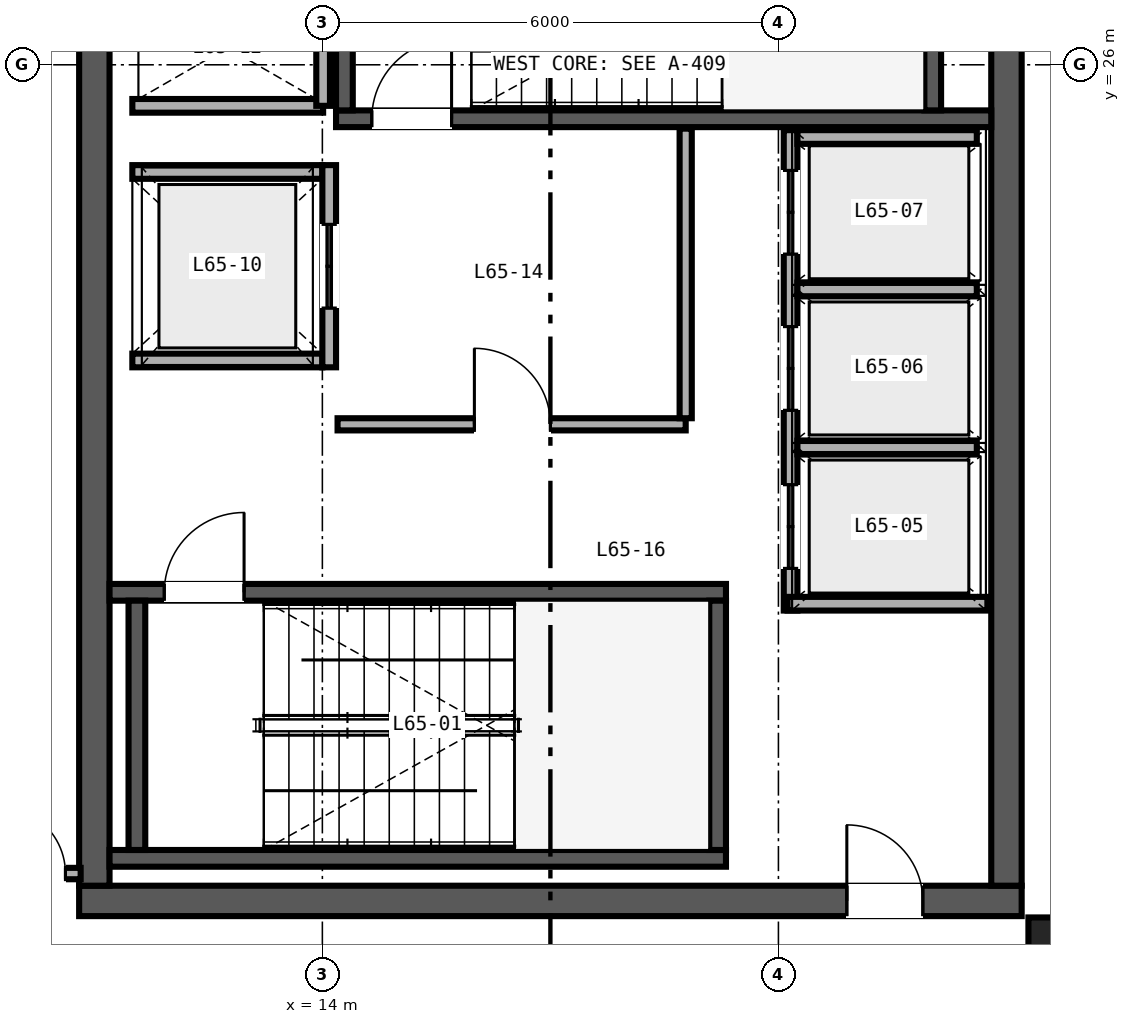
"""IFC4 building model, lengths in metres.
Left out: names, types, materials, properties, quantities, classifications, styles, units other than length and angle.
Written with IfcOpenShell. Run it as: python <this file> out.ifc"""

import sys

from ifc_helpers import new_model, si_unit, direction, frame, frame_2d, origin, origin_2d, place, context, subcontext, project, spatial, rectangle, i_section, extrude, source, transform, mapped, element, fill, save


model = new_model("IFC4")
c1 = context("Model", 3, precision=1e-05, world=origin(), true_north=direction((0.0, 1.0)))
c2 = subcontext(c1, "Body", "Model", "MODEL_VIEW")
j1 = project(units=[si_unit("LENGTHUNIT", "METRE"), si_unit("PLANEANGLEUNIT", "RADIAN")], contexts=[c1])
p1 = place(None, origin())
s1 = spatial("IfcSite", under=j1, at=p1, CompositionType="ELEMENT")
p2 = place(p1, origin())
s2 = spatial("IfcBuilding", under=s1, at=p2, CompositionType="ELEMENT")
p3 = place(p2, frame((0.0, 0.0, 258.0)))
s3 = spatial("IfcBuildingStorey", under=s2, at=p3, CompositionType="ELEMENT", Elevation=258.0)
p4 = place(p3, frame((10.8, 15.0, 0.0), z_axis=(0.0, 0.0, 1.0), x_axis=(1.0, 0.0, 0.0)))
e1 = element("IfcWall", 1, at=p4, inside=s3, PredefinedType="SHEAR", context=c2, shape_type="SweptSolid", body=[
    extrude(rectangle(XDim=12.4, YDim=0.4, at=frame_2d((6.2, 0.0))), origin(), (0.0, 0.0, 1.0), 3.38),
])
p5 = place(p4, frame((10.1, 0.0, 0.0)))
e2 = element("IfcOpeningElement", 2, at=p5, cuts=e1, PredefinedType="OPENING", context=c2, shape_type="SweptSolid", body=[
    extrude(rectangle(XDim=1.0, YDim=2.15, at=frame_2d((0.5, 1.075))), frame((0.0, 0.21, 0.0), z_axis=(0.0, -1.0, 0.0), x_axis=(1.0, 0.0, 0.0)), (0.0, 0.0, 1.0), 0.42),
])
for number, where, z_axis, x_axis in (
    (3, (11.0, 15.2, 0.0), (0.0, 0.0, 1.0), (0.0, 1.0, 0.0)),
    (4, (23.0, 15.2, 0.0), (0.0, 0.0, 1.0), (0.0, 1.0, 0.0)),
):
    element("IfcWall", number, at=place(p3, frame(where, z_axis=z_axis, x_axis=x_axis)), inside=s3, PredefinedType="SHEAR", context=c2, shape_type="SweptSolid", body=[
        extrude(rectangle(XDim=21.6, YDim=0.4, at=frame_2d((10.8, 0.0))), origin(), (0.0, 0.0, 1.0), 3.38),
    ])
p6 = place(p3, frame((11.2, 15.56, 0.0), z_axis=(0.0, 0.0, 1.0), x_axis=(1.0, 0.0, 0.0)))
e5 = element("IfcWall", 5, at=p6, inside=s3, PredefinedType="SHEAR", context=c2, shape_type="SweptSolid", body=[
    extrude(rectangle(XDim=8.11, YDim=0.22, at=frame_2d((4.055, 0.0))), origin(), (0.0, 0.0, 1.0), 3.4),
])
p7 = place(p3, frame((11.2, 19.06, 0.0), z_axis=(0.0, 0.0, 1.0), x_axis=(1.0, 0.0, 0.0)))
e6 = element("IfcWall", 6, at=p7, inside=s3, PredefinedType="SHEAR", context=c2, shape_type="SweptSolid", body=[
    extrude(rectangle(XDim=8.11, YDim=0.22, at=frame_2d((4.055, 0.0))), origin(), (0.0, 0.0, 1.0), 3.4),
])
p8 = place(p7, frame((0.72, 0.0, 0.0)))
e7 = element("IfcOpeningElement", 7, at=p8, cuts=e6, PredefinedType="OPENING", context=c2, shape_type="SweptSolid", body=[
    extrude(rectangle(XDim=1.05, YDim=2.15, at=frame_2d((0.525, 1.075))), frame((0.0, 0.12, 0.0), z_axis=(0.0, -1.0, 0.0), x_axis=(1.0, 0.0, 0.0)), (0.0, 0.0, 1.0), 0.24),
])
for number, where, z_axis, x_axis in (
    (8, (11.56, 15.67, 0.0), (0.0, 0.0, 1.0), (0.0, 1.0, 0.0)),
    (9, (19.2, 15.67, 0.0), (0.0, 0.0, 1.0), (0.0, 1.0, 0.0)),
):
    element("IfcWall", number, at=place(p3, frame(where, z_axis=z_axis, x_axis=x_axis)), inside=s3, PredefinedType="SHEAR", context=c2, shape_type="SweptSolid", body=[
        extrude(rectangle(XDim=3.28, YDim=0.22, at=frame_2d((1.64, 0.0))), origin(), (0.0, 0.0, 1.0), 3.4),
    ])
p9 = place(p3, frame((14.18, 25.29, 0.0), z_axis=(0.0, 0.0, 1.0), x_axis=(1.0, 0.0, 0.0)))
e10 = element("IfcWall", 10, at=p9, inside=s3, PredefinedType="SHEAR", context=c2, shape_type="SweptSolid", body=[
    extrude(rectangle(XDim=8.62, YDim=0.22, at=frame_2d((4.31, 0.0))), origin(), (0.0, 0.0, 1.0), 3.4),
])
p10 = place(p9, frame((0.47, 0.0, 0.0)))
e11 = element("IfcOpeningElement", 11, at=p10, cuts=e10, PredefinedType="OPENING", context=c2, shape_type="SweptSolid", body=[
    extrude(rectangle(XDim=1.05, YDim=2.15, at=frame_2d((0.525, 1.075))), frame((0.0, 0.12, 0.0), z_axis=(0.0, -1.0, 0.0), x_axis=(1.0, 0.0, 0.0)), (0.0, 0.0, 1.0), 0.24),
])
for number, where, z_axis, x_axis in (
    (12, (14.29, 25.4, 0.0), (0.0, 0.0, 1.0), (0.0, 1.0, 0.0)),
    (13, (22.03, 25.4, 0.0), (0.0, 0.0, 1.0), (0.0, 1.0, 0.0)),
):
    element("IfcWall", number, at=place(p3, frame(where, z_axis=z_axis, x_axis=x_axis)), inside=s3, PredefinedType="SHEAR", context=c2, shape_type="SweptSolid", body=[
        extrude(rectangle(XDim=3.28, YDim=0.22, at=frame_2d((1.64, 0.0))), origin(), (0.0, 0.0, 1.0), 3.4),
    ])
m1 = source(origin(), c2, "Body", "SweptSolid", [
    extrude(i_section(OverallWidth=0.422, OverallDepth=0.465, WebThickness=0.045, FlangeThickness=0.073, FilletRadius=0.025, at=origin_2d()), origin(), (0.0, 0.0, 1.0), 3.38),
])
p11 = place(p3, frame((23.5, 14.55, 0.0), z_axis=(0.0, 0.0, 1.0), x_axis=(1.0, 0.0, 0.0)))
e14 = element("IfcColumn", 14, at=p11, inside=s3, PredefinedType="COLUMN", context=c2, shape_type="MappedRepresentation", body=[
    mapped(m1, transform((0.0, 0.0, 0.0), scale=1.0)),
])
p12 = place(p3, frame((20.16, 18.82, 0.0), z_axis=(0.0, 0.0, 1.0), x_axis=(0.0, 1.0, 0.0)))
e15 = element("IfcWall", 15, at=p12, inside=s3, PredefinedType="SOLIDWALL", context=c2, shape_type="SweptSolid", body=[
    extrude(rectangle(XDim=6.32, YDim=0.18, at=frame_2d((3.16, 0.0))), origin(), (0.0, 0.0, 1.0), 2.48),
])
p13 = place(p12, frame((0.555, 0.0, 0.0)))
e16 = element("IfcOpeningElement", 16, at=p13, cuts=e15, PredefinedType="OPENING", context=c2, shape_type="SweptSolid", body=[
    extrude(rectangle(XDim=1.1, YDim=2.2, at=frame_2d((0.55, 1.1))), frame((0.0, 0.1, 0.0), z_axis=(0.0, -1.0, 0.0), x_axis=(1.0, 0.0, 0.0)), (0.0, 0.0, 1.0), 0.2),
])
p14 = place(p12, frame((2.635, 0.0, 0.0)))
e17 = element("IfcOpeningElement", 17, at=p14, cuts=e15, PredefinedType="OPENING", context=c2, shape_type="SweptSolid", body=[
    extrude(rectangle(XDim=1.1, YDim=2.2, at=frame_2d((0.55, 1.1))), frame((0.0, 0.1, 0.0), z_axis=(0.0, -1.0, 0.0), x_axis=(1.0, 0.0, 0.0)), (0.0, 0.0, 1.0), 0.2),
])
p15 = place(p12, frame((4.69, 0.0, 0.0)))
e18 = element("IfcOpeningElement", 18, at=p15, cuts=e15, PredefinedType="OPENING", context=c2, shape_type="SweptSolid", body=[
    extrude(rectangle(XDim=1.1, YDim=2.2, at=frame_2d((0.55, 1.1))), frame((0.0, 0.1, 0.0), z_axis=(0.0, -1.0, 0.0), x_axis=(1.0, 0.0, 0.0)), (0.0, 0.0, 1.0), 0.2),
])
p16 = place(p3, frame((20.12, 18.91, 0.0), z_axis=(0.0, 0.0, 1.0), x_axis=(1.0, 0.0, 0.0)))
e19 = element("IfcWall", 19, at=p16, inside=s3, PredefinedType="SOLIDWALL", context=c2, shape_type="SweptSolid", body=[
    extrude(rectangle(XDim=2.63, YDim=0.18, at=frame_2d((1.315, 0.0))), origin(), (0.0, 0.0, 1.0), 3.38),
])
p17 = place(p3, frame((20.25, 25.05, 0.0), z_axis=(0.0, 0.0, 1.0), x_axis=(1.0, 0.0, 0.0)))
e20 = element("IfcWall", 20, at=p17, inside=s3, PredefinedType="SOLIDWALL", context=c2, shape_type="SweptSolid", body=[
    extrude(rectangle(XDim=2.36, YDim=0.18, at=frame_2d((1.18, 0.0))), origin(), (0.0, 0.0, 1.0), 3.38),
])
p18 = place(p3, frame((20.25, 20.965, 0.0), z_axis=(0.0, 0.0, 1.0), x_axis=(1.0, 0.0, 0.0)))
e21 = element("IfcWall", 21, at=p18, inside=s3, PredefinedType="SOLIDWALL", context=c2, shape_type="SweptSolid", body=[
    extrude(rectangle(XDim=2.36, YDim=0.18, at=frame_2d((1.18, 0.0))), origin(), (0.0, 0.0, 1.0), 2.48),
])
p19 = place(p3, frame((20.25, 23.045, 0.0), z_axis=(0.0, 0.0, 1.0), x_axis=(1.0, 0.0, 0.0)))
e22 = element("IfcWall", 22, at=p19, inside=s3, PredefinedType="SOLIDWALL", context=c2, shape_type="SweptSolid", body=[
    extrude(rectangle(XDim=2.36, YDim=0.18, at=frame_2d((1.18, 0.0))), origin(), (0.0, 0.0, 1.0), 3.38),
])
for number, where, z_axis, x_axis in (
    (23, (11.5, 22.11, 0.0), (0.0, 0.0, 1.0), (1.0, 0.0, 0.0)),
    (24, (11.5, 24.59, 0.0), (0.0, 0.0, 1.0), (1.0, 0.0, 0.0)),
):
    element("IfcWall", number, at=place(p3, frame(where, z_axis=z_axis, x_axis=x_axis)), inside=s3, PredefinedType="SOLIDWALL", context=c2, shape_type="SweptSolid", body=[
        extrude(rectangle(XDim=2.5, YDim=0.18, at=frame_2d((1.25, 0.0))), origin(), (0.0, 0.0, 1.0), 3.38),
    ])
p20 = place(p3, frame((14.09, 22.02, 0.0), z_axis=(0.0, 0.0, 1.0), x_axis=(0.0, 1.0, 0.0)))
e25 = element("IfcWall", 25, at=p20, inside=s3, PredefinedType="SOLIDWALL", context=c2, shape_type="SweptSolid", body=[
    extrude(rectangle(XDim=2.66, YDim=0.18, at=frame_2d((1.33, 0.0))), origin(), (0.0, 0.0, 1.0), 3.38),
])
p21 = place(p20, frame((0.78, 0.0, 0.0)))
e26 = element("IfcOpeningElement", 26, at=p21, cuts=e25, PredefinedType="OPENING", context=c2, shape_type="SweptSolid", body=[
    extrude(rectangle(XDim=1.1, YDim=2.2, at=frame_2d((0.55, 1.1))), frame((0.0, 0.1, 0.0), z_axis=(0.0, -1.0, 0.0), x_axis=(1.0, 0.0, 0.0)), (0.0, 0.0, 1.0), 0.2),
])
p22 = place(p3, frame((11.5, 25.46, 0.0), z_axis=(0.0, 0.0, 1.0), x_axis=(1.0, 0.0, 0.0)))
e27 = element("IfcWall", 27, at=p22, inside=s3, PredefinedType="SOLIDWALL", context=c2, shape_type="SweptSolid", body=[
    extrude(rectangle(XDim=2.51, YDim=0.18, at=frame_2d((1.255, 0.0))), origin(), (0.0, 0.0, 1.0), 3.38),
])
p23 = place(p3, frame((14.01, 25.46, 0.0), z_axis=(0.0, 0.0, 1.0), x_axis=(0.0, 1.0, 0.0)))
e28 = element("IfcWall", 28, at=p23, inside=s3, PredefinedType="SOLIDWALL", context=c2, shape_type="SweptSolid", body=[
    extrude(rectangle(XDim=3.08, YDim=0.18, at=frame_2d((1.54, 0.0))), origin(), (0.0, 0.0, 1.0), 3.38),
])
p24 = place(p3, frame((14.2, 21.27, 0.0), z_axis=(0.0, 0.0, 1.0), x_axis=(1.0, 0.0, 0.0)))
e29 = element("IfcWall", 29, at=p24, inside=s3, PredefinedType="PARTITIONING", context=c2, shape_type="SweptSolid", body=[
    extrude(rectangle(XDim=4.58, YDim=0.16, at=frame_2d((2.29, 0.0))), origin(), (0.0, 0.0, 1.0), 3.38),
])
p25 = place(p24, frame((1.8, 0.0, 0.0)))
e30 = element("IfcOpeningElement", 30, at=p25, cuts=e29, PredefinedType="OPENING", context=c2, shape_type="SweptSolid", body=[
    extrude(rectangle(XDim=1.0, YDim=2.15, at=frame_2d((0.5, 1.075))), frame((0.0, 0.09, 0.0), z_axis=(0.0, -1.0, 0.0), x_axis=(1.0, 0.0, 0.0)), (0.0, 0.0, 1.0), 0.18),
])
p26 = place(p3, frame((18.78, 21.35, 0.0), z_axis=(0.0, 0.0, 1.0), x_axis=(0.0, 1.0, 0.0)))
e31 = element("IfcWall", 31, at=p26, inside=s3, PredefinedType="PARTITIONING", context=c2, shape_type="SweptSolid", body=[
    extrude(rectangle(XDim=3.81, YDim=0.16, at=frame_2d((1.905, 0.0))), origin(), (0.0, 0.0, 1.0), 3.38),
])
p27 = place(p3, frame((8.16, 15.36, 0.0), z_axis=(0.0, 0.0, 1.0), x_axis=(1.0, 0.0, 0.0)))
e32 = element("IfcWall", 32, at=p27, inside=s3, PredefinedType="PARTITIONING", context=c2, shape_type="SweptSolid", body=[
    extrude(rectangle(XDim=2.66, YDim=0.15, at=frame_2d((1.33, 0.0))), origin(), (0.0, 0.0, 1.0), 2.601),
])
p28 = place(p27, frame((1.58, 0.0, 0.0)))
e33 = element("IfcOpeningElement", 33, at=p28, cuts=e32, PredefinedType="OPENING", context=c2, shape_type="SweptSolid", body=[
    extrude(rectangle(XDim=0.88, YDim=2.15, at=frame_2d((0.44, 1.075))), frame((0.0, 0.085, 0.0), z_axis=(0.0, -1.0, 0.0), x_axis=(1.0, 0.0, 0.0)), (0.0, 0.0, 1.0), 0.17),
])
m2 = source(origin(), c2, "Body", "SweptSolid", [
    extrude(rectangle(XDim=1.05, YDim=2.15, at=frame_2d((0.525, 1.075))), frame((0.0, 0.025, 0.0), z_axis=(0.0, -1.0, 0.0), x_axis=(1.0, 0.0, 0.0)), (0.0, 0.0, 1.0), 0.05),
])
p29 = place(p8, origin())
e34 = element("IfcDoor", 34, at=p29, inside=s3, OperationType="SINGLE_SWING_RIGHT", PredefinedType="DOOR", context=c2, shape_type="MappedRepresentation", body=[
    mapped(m2, transform((0.0, 0.0, 0.0), scale=1.0)),
])
fill(e7, e34)
p30 = place(p10, origin())
e35 = element("IfcDoor", 35, at=p30, inside=s3, OperationType="SINGLE_SWING_RIGHT", PredefinedType="DOOR", context=c2, shape_type="MappedRepresentation", body=[
    mapped(m2, transform((0.0, 0.0, 0.0), scale=1.0)),
])
fill(e11, e35)
m3 = source(origin(), c2, "Body", "SweptSolid", [
    extrude(rectangle(XDim=1.1, YDim=2.2, at=frame_2d((0.55, 1.1))), frame((0.0, 0.025, 0.0), z_axis=(0.0, -1.0, 0.0), x_axis=(1.0, 0.0, 0.0)), (0.0, 0.0, 1.0), 0.05),
])
p31 = place(p13, origin())
e36 = element("IfcDoor", 36, at=p31, inside=s3, OperationType="DOUBLE_DOOR_SLIDING", PredefinedType="DOOR", context=c2, shape_type="MappedRepresentation", body=[
    mapped(m3, transform((0.0, 0.0, 0.0), scale=1.0)),
])
fill(e16, e36)
p32 = place(p14, origin())
e37 = element("IfcDoor", 37, at=p32, inside=s3, OperationType="DOUBLE_DOOR_SLIDING", PredefinedType="DOOR", context=c2, shape_type="MappedRepresentation", body=[
    mapped(m3, transform((0.0, 0.0, 0.0), scale=1.0)),
])
fill(e17, e37)
p33 = place(p15, origin())
e38 = element("IfcDoor", 38, at=p33, inside=s3, OperationType="DOUBLE_DOOR_SLIDING", PredefinedType="DOOR", context=c2, shape_type="MappedRepresentation", body=[
    mapped(m3, transform((0.0, 0.0, 0.0), scale=1.0)),
])
fill(e18, e38)
p34 = place(p21, origin())
e39 = element("IfcDoor", 39, at=p34, inside=s3, OperationType="DOUBLE_DOOR_SLIDING", PredefinedType="DOOR", context=c2, shape_type="MappedRepresentation", body=[
    mapped(m3, transform((0.0, 0.0, 0.0), scale=1.0)),
])
fill(e26, e39)
m4 = source(origin(), c2, "Body", "SweptSolid", [
    extrude(rectangle(XDim=1.0, YDim=2.15, at=frame_2d((0.5, 1.075))), frame((0.0, 0.025, 0.0), z_axis=(0.0, -1.0, 0.0), x_axis=(1.0, 0.0, 0.0)), (0.0, 0.0, 1.0), 0.05),
])
p35 = place(p25, origin())
e40 = element("IfcDoor", 40, at=p35, inside=s3, OperationType="SINGLE_SWING_LEFT", PredefinedType="DOOR", context=c2, shape_type="MappedRepresentation", body=[
    mapped(m4, transform((0.0, 0.0, 0.0), scale=1.0)),
])
fill(e30, e40)
p36 = place(p5, origin())
e41 = element("IfcDoor", 41, at=p36, inside=s3, OperationType="SINGLE_SWING_LEFT", PredefinedType="DOOR", context=c2, shape_type="MappedRepresentation", body=[
    mapped(m4, transform((0.0, 0.0, 0.0), scale=1.0)),
])
fill(e2, e41)
m5 = source(origin(), c2, "Body", "SweptSolid", [
    extrude(rectangle(XDim=0.88, YDim=2.15, at=frame_2d((0.44, 1.075))), frame((0.0, 0.025, 0.0), z_axis=(0.0, -1.0, 0.0), x_axis=(1.0, 0.0, 0.0)), (0.0, 0.0, 1.0), 0.05),
])
p37 = place(p28, origin())
e42 = element("IfcDoor", 42, at=p37, inside=s3, OperationType="SINGLE_SWING_LEFT", PredefinedType="DOOR", context=c2, shape_type="MappedRepresentation", body=[
    mapped(m5, transform((0.0, 0.0, 0.0), scale=1.0)),
])
fill(e33, e42)
save(model, sys.argv[1])
